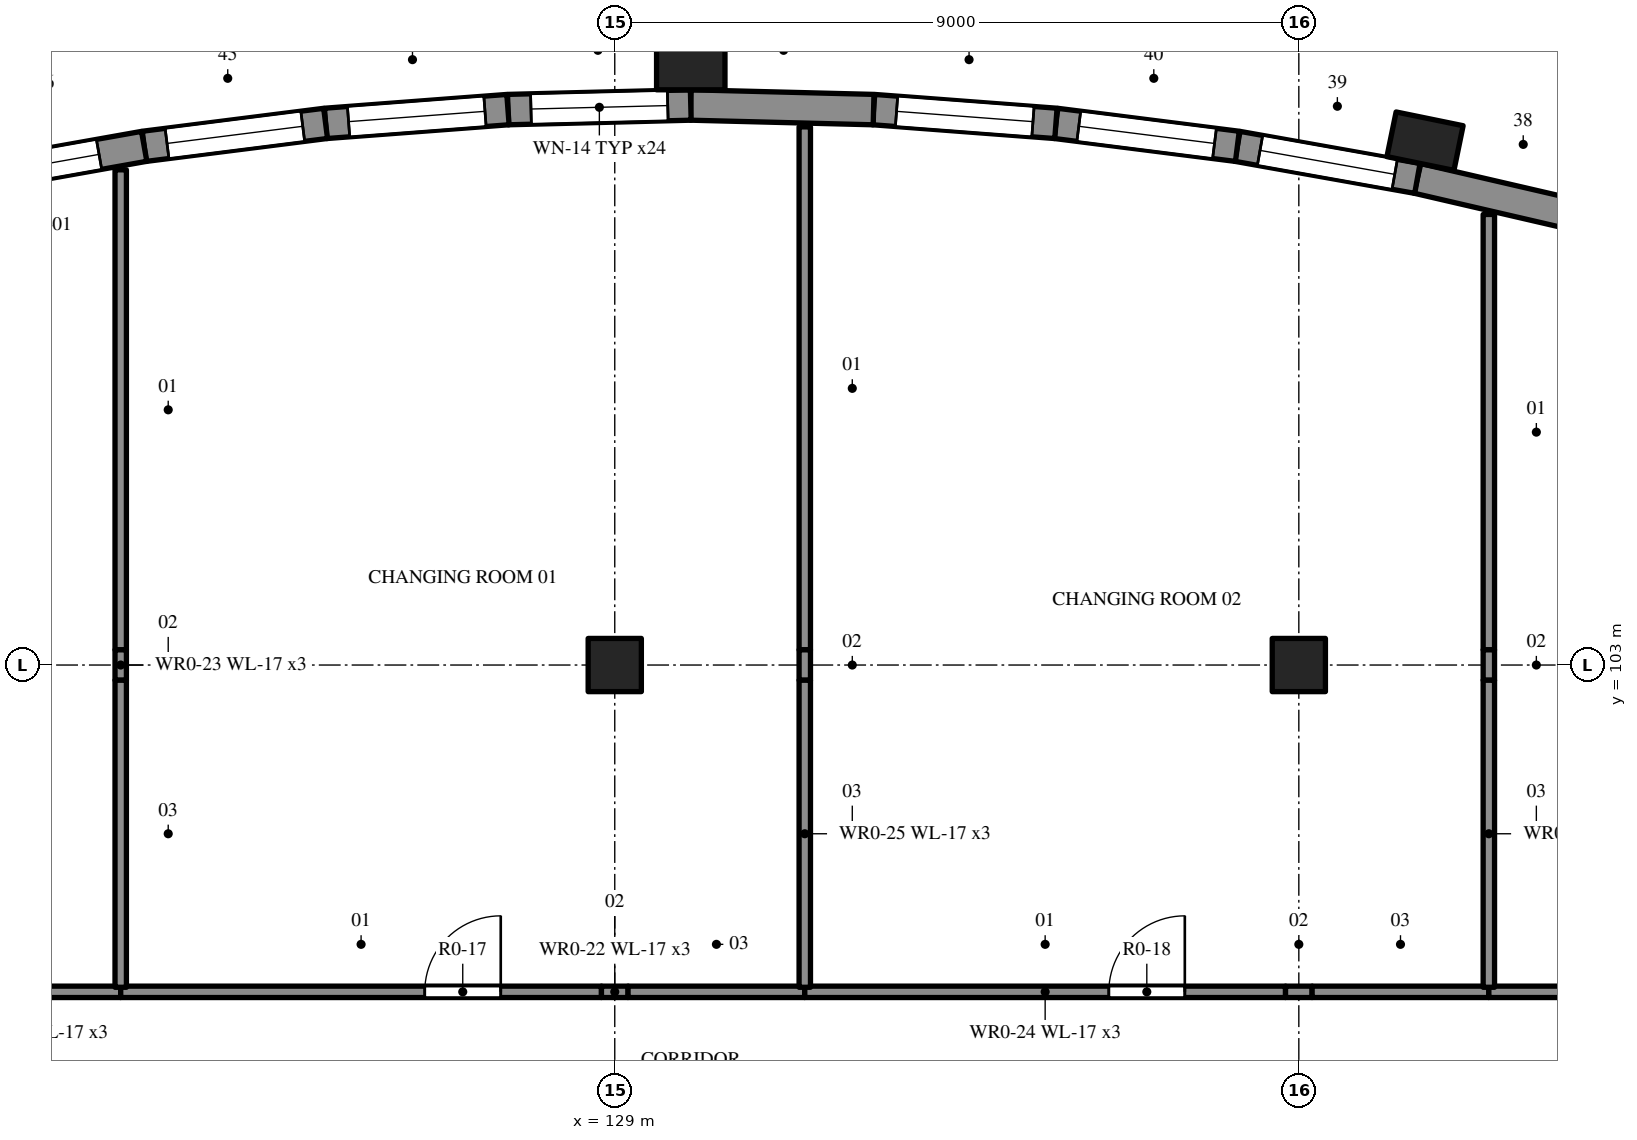
"""IFC4 building model, lengths in metres.
Left out: names, types, materials, properties, quantities, classifications, styles, units other than length and angle.
Written with IfcOpenShell. Run it as: python <this file> out.ifc"""

import sys

from ifc_helpers import new_model, si_unit, direction, frame, frame_2d, origin, origin_2d, place, context, subcontext, project, spatial, rectangle, extrude, element, fill, save


model = new_model("IFC4")
c1 = context("Model", 3, precision=1e-05, world=origin(), true_north=direction((0.0, 1.0)))
c2 = subcontext(c1, "Body", "Model", "MODEL_VIEW")
j1 = project(units=[si_unit("LENGTHUNIT", "METRE"), si_unit("PLANEANGLEUNIT", "RADIAN")], contexts=[c1])
p1 = place(None, origin())
s1 = spatial("IfcSite", under=j1, at=p1, CompositionType="ELEMENT")
p2 = place(p1, origin())
s2 = spatial("IfcBuilding", under=s1, at=p2, CompositionType="ELEMENT")
p3 = place(p2, origin())
s3 = spatial("IfcBuildingStorey", under=s2, at=p3, CompositionType="ELEMENT", Elevation=0.0)
for number, where, z_axis, x_axis in (
    (1, (129.0, 103.0, -0.25), (0.0, 0.0, 1.0), (1.0, 0.0, 0.0)),
    (2, (138.0, 103.0, -0.25), (0.0, 0.0, 1.0), (1.0, 0.0, 0.0)),
):
    element("IfcColumn", number, at=place(p3, frame(where, z_axis=z_axis, x_axis=x_axis)), inside=s3, PredefinedType="COLUMN", context=c2, shape_type="SweptSolid", body=[
        extrude(rectangle(XDim=0.7, YDim=0.7, at=origin_2d()), origin(), (0.0, 0.0, 1.0), 5.37),
    ])
p4 = place(p3, frame((142.006, 108.836, -0.25), z_axis=(0.0, 0.0, 1.0), x_axis=(-0.974189274843, 0.225732710925, 0.0)))
e3 = element("IfcWall", 3, at=p4, inside=s3, PredefinedType="SOLIDWALL", context=c2, shape_type="SweptSolid", body=[
    extrude(rectangle(XDim=2.511, YDim=0.4, at=frame_2d((1.256, 0.0))), origin(), (0.0, 0.0, 1.0), 5.65),
])
p5 = place(p3, frame((139.56, 109.403, -0.25), z_axis=(0.0, 0.0, 1.0), x_axis=(-0.984524011381, 0.175249738987, 0.0)))
e4 = element("IfcWall", 4, at=p5, inside=s3, PredefinedType="SOLIDWALL", context=c2, shape_type="SweptSolid", body=[
    extrude(rectangle(XDim=2.406, YDim=0.4, at=frame_2d((1.203, 0.0))), origin(), (0.0, 0.0, 1.0), 5.65),
])
p6 = place(p5, frame((0.303, 0.0, 1.25)))
e5 = element("IfcOpeningElement", 5, at=p6, cuts=e4, PredefinedType="OPENING", context=c2, shape_type="SweptSolid", body=[
    extrude(rectangle(XDim=1.8, YDim=2.1, at=frame_2d((0.9, 1.05))), frame((0.0, 0.21, 0.0), z_axis=(0.0, -1.0, 0.0), x_axis=(1.0, 0.0, 0.0)), (0.0, 0.0, 1.0), 0.42),
])
p7 = place(p3, frame((137.191, 109.825, -0.25), z_axis=(0.0, 0.0, 1.0), x_axis=(-0.99208939311, 0.125533406227, 0.0)))
e6 = element("IfcWall", 6, at=p7, inside=s3, PredefinedType="SOLIDWALL", context=c2, shape_type="SweptSolid", body=[
    extrude(rectangle(XDim=2.406, YDim=0.4, at=frame_2d((1.203, 0.0))), origin(), (0.0, 0.0, 1.0), 5.65),
])
p8 = place(p7, frame((0.303, 0.0, 1.25)))
e7 = element("IfcOpeningElement", 7, at=p8, cuts=e6, PredefinedType="OPENING", context=c2, shape_type="SweptSolid", body=[
    extrude(rectangle(XDim=1.8, YDim=2.1, at=frame_2d((0.9, 1.05))), frame((0.0, 0.21, 0.0), z_axis=(0.0, -1.0, 0.0), x_axis=(1.0, 0.0, 0.0)), (0.0, 0.0, 1.0), 0.42),
])
p9 = place(p3, frame((134.804, 110.127, -0.25), z_axis=(0.0, 0.0, 1.0), x_axis=(-0.997153910364, 0.075392831525, 0.0)))
e8 = element("IfcWall", 8, at=p9, inside=s3, PredefinedType="SOLIDWALL", context=c2, shape_type="SweptSolid", body=[
    extrude(rectangle(XDim=2.406, YDim=0.4, at=frame_2d((1.203, 0.0))), origin(), (0.0, 0.0, 1.0), 5.65),
])
p10 = place(p9, frame((0.303, 0.0, 1.25)))
e9 = element("IfcOpeningElement", 9, at=p10, cuts=e8, PredefinedType="OPENING", context=c2, shape_type="SweptSolid", body=[
    extrude(rectangle(XDim=1.8, YDim=2.1, at=frame_2d((0.9, 1.05))), frame((0.0, 0.21, 0.0), z_axis=(0.0, -1.0, 0.0), x_axis=(1.0, 0.0, 0.0)), (0.0, 0.0, 1.0), 0.42),
])
p11 = place(p3, frame((132.405, 110.308, -0.25), z_axis=(0.0, 0.0, 1.0), x_axis=(-0.999683321759, 0.025164582196, 0.0)))
e10 = element("IfcWall", 10, at=p11, inside=s3, PredefinedType="SOLIDWALL", context=c2, shape_type="SweptSolid", body=[
    extrude(rectangle(XDim=2.406, YDim=0.4, at=frame_2d((1.203, 0.0))), origin(), (0.0, 0.0, 1.0), 5.65),
])
p12 = place(p3, frame((130.0, 110.369, -0.25), z_axis=(0.0, 0.0, 1.0), x_axis=(-0.999683321759, -0.025164582196, 0.0)))
e11 = element("IfcWall", 11, at=p12, inside=s3, PredefinedType="SOLIDWALL", context=c2, shape_type="SweptSolid", body=[
    extrude(rectangle(XDim=2.406, YDim=0.4, at=frame_2d((1.203, 0.0))), origin(), (0.0, 0.0, 1.0), 5.65),
])
p13 = place(p12, frame((0.303, 0.0, 1.25)))
e12 = element("IfcOpeningElement", 12, at=p13, cuts=e11, PredefinedType="OPENING", context=c2, shape_type="SweptSolid", body=[
    extrude(rectangle(XDim=1.8, YDim=2.1, at=frame_2d((0.9, 1.05))), frame((0.0, 0.21, 0.0), z_axis=(0.0, -1.0, 0.0), x_axis=(1.0, 0.0, 0.0)), (0.0, 0.0, 1.0), 0.42),
])
p14 = place(p3, frame((127.595, 110.308, -0.25), z_axis=(0.0, 0.0, 1.0), x_axis=(-0.997153910364, -0.075392831525, 0.0)))
e13 = element("IfcWall", 13, at=p14, inside=s3, PredefinedType="SOLIDWALL", context=c2, shape_type="SweptSolid", body=[
    extrude(rectangle(XDim=2.406, YDim=0.4, at=frame_2d((1.203, 0.0))), origin(), (0.0, 0.0, 1.0), 5.65),
])
p15 = place(p14, frame((0.303, 0.0, 1.25)))
e14 = element("IfcOpeningElement", 14, at=p15, cuts=e13, PredefinedType="OPENING", context=c2, shape_type="SweptSolid", body=[
    extrude(rectangle(XDim=1.8, YDim=2.1, at=frame_2d((0.9, 1.05))), frame((0.0, 0.21, 0.0), z_axis=(0.0, -1.0, 0.0), x_axis=(1.0, 0.0, 0.0)), (0.0, 0.0, 1.0), 0.42),
])
p16 = place(p3, frame((125.196, 110.127, -0.25), z_axis=(0.0, 0.0, 1.0), x_axis=(-0.99208939311, -0.125533406227, 0.0)))
e15 = element("IfcWall", 15, at=p16, inside=s3, PredefinedType="SOLIDWALL", context=c2, shape_type="SweptSolid", body=[
    extrude(rectangle(XDim=2.406, YDim=0.4, at=frame_2d((1.203, 0.0))), origin(), (0.0, 0.0, 1.0), 5.65),
])
p17 = place(p16, frame((0.303, 0.0, 1.25)))
e16 = element("IfcOpeningElement", 16, at=p17, cuts=e15, PredefinedType="OPENING", context=c2, shape_type="SweptSolid", body=[
    extrude(rectangle(XDim=1.8, YDim=2.1, at=frame_2d((0.9, 1.05))), frame((0.0, 0.21, 0.0), z_axis=(0.0, -1.0, 0.0), x_axis=(1.0, 0.0, 0.0)), (0.0, 0.0, 1.0), 0.42),
])
p18 = place(p3, frame((122.809, 109.825, -0.25), z_axis=(0.0, 0.0, 1.0), x_axis=(-0.984524011381, -0.175249738987, 0.0)))
e17 = element("IfcWall", 17, at=p18, inside=s3, PredefinedType="SOLIDWALL", context=c2, shape_type="SweptSolid", body=[
    extrude(rectangle(XDim=2.406, YDim=0.4, at=frame_2d((1.203, 0.0))), origin(), (0.0, 0.0, 1.0), 5.65),
])
p19 = place(p18, frame((0.603, 0.0, 1.15)))
e18 = element("IfcOpeningElement", 18, at=p19, cuts=e17, PredefinedType="OPENING", context=c2, shape_type="SweptSolid", body=[
    extrude(rectangle(XDim=1.5, YDim=2.1, at=frame_2d((0.75, 1.05))), frame((0.0, 0.21, 0.0), z_axis=(0.0, -1.0, 0.0), x_axis=(1.0, 0.0, 0.0)), (0.0, 0.0, 1.0), 0.42),
])
for number, where, z_axis, x_axis in (
    (19, (130.0, 110.869, -0.25), (0.0, 0.0, 1.0), (-1.0, 0.0, 0.0)),
    (20, (139.66, 109.893, -0.25), (0.0, 0.0, 1.0), (-0.98, 0.201, 0.0)),
):
    element("IfcColumn", number, at=place(p3, frame(where, z_axis=z_axis, x_axis=x_axis)), inside=s3, PredefinedType="PILASTER", context=c2, shape_type="SweptSolid", body=[
        extrude(rectangle(XDim=0.9, YDim=0.6, at=origin_2d()), origin(), (0.0, 0.0, 1.0), 5.65),
    ])
p20 = place(p3, frame((120.175, 98.7, 0.0), z_axis=(0.0, 0.0, 1.0), x_axis=(1.0, 0.0, 0.0)))
e21 = element("IfcWall", 21, at=p20, inside=s3, PredefinedType="PARTITIONING", context=c2, shape_type="SweptSolid", body=[
    extrude(rectangle(XDim=2.325, YDim=0.15, at=frame_2d((1.163, 0.0))), origin(), (0.0, 0.0, 1.0), 5.12),
])
p21 = place(p3, frame((122.5, 98.7, 0.0), z_axis=(0.0, 0.0, 1.0), x_axis=(1.0, 0.0, 0.0)))
e22 = element("IfcWall", 22, at=p21, inside=s3, PredefinedType="PARTITIONING", context=c2, shape_type="SweptSolid", body=[
    extrude(rectangle(XDim=6.325, YDim=0.15, at=frame_2d((3.163, 0.0))), origin(), (0.0, 0.0, 1.0), 5.12),
])
p22 = place(p21, frame((4.0, 0.0, 0.0)))
e23 = element("IfcOpeningElement", 23, at=p22, cuts=e22, PredefinedType="OPENING", context=c2, shape_type="SweptSolid", body=[
    extrude(rectangle(XDim=1.0, YDim=2.1, at=frame_2d((0.5, 1.05))), frame((0.0, 0.085, 0.0), z_axis=(0.0, -1.0, 0.0), x_axis=(1.0, 0.0, 0.0)), (0.0, 0.0, 1.0), 0.17),
])
p23 = place(p3, frame((128.825, 98.7, 0.0), z_axis=(0.0, 0.0, 1.0), x_axis=(1.0, 0.0, 0.0)))
e24 = element("IfcWall", 24, at=p23, inside=s3, PredefinedType="PARTITIONING", context=c2, shape_type="SweptSolid", body=[
    extrude(rectangle(XDim=0.35, YDim=0.15, at=frame_2d((0.175, 0.0))), origin(), (0.0, 0.0, 1.0), 4.42),
])
p24 = place(p3, frame((129.175, 98.7, 0.0), z_axis=(0.0, 0.0, 1.0), x_axis=(1.0, 0.0, 0.0)))
e25 = element("IfcWall", 25, at=p24, inside=s3, PredefinedType="PARTITIONING", context=c2, shape_type="SweptSolid", body=[
    extrude(rectangle(XDim=2.325, YDim=0.15, at=frame_2d((1.163, 0.0))), origin(), (0.0, 0.0, 1.0), 5.12),
])
p25 = place(p3, frame((122.5, 109.516, 0.0), z_axis=(0.0, 0.0, 1.0), x_axis=(0.0, -1.0, 0.0)))
e26 = element("IfcWall", 26, at=p25, inside=s3, PredefinedType="PARTITIONING", context=c2, shape_type="SweptSolid", body=[
    extrude(rectangle(XDim=6.316, YDim=0.15, at=frame_2d((3.158, 0.0))), origin(), (0.0, 0.0, 1.0), 5.12),
])
p26 = place(p3, frame((122.5, 103.2, 0.0), z_axis=(0.0, 0.0, 1.0), x_axis=(0.0, -1.0, 0.0)))
e27 = element("IfcWall", 27, at=p26, inside=s3, PredefinedType="PARTITIONING", context=c2, shape_type="SweptSolid", body=[
    extrude(rectangle(XDim=0.4, YDim=0.15, at=frame_2d((0.2, 0.0))), origin(), (0.0, 0.0, 1.0), 4.32),
])
p27 = place(p3, frame((122.5, 102.8, 0.0), z_axis=(0.0, 0.0, 1.0), x_axis=(0.0, -1.0, 0.0)))
e28 = element("IfcWall", 28, at=p27, inside=s3, PredefinedType="PARTITIONING", context=c2, shape_type="SweptSolid", body=[
    extrude(rectangle(XDim=4.04, YDim=0.15, at=frame_2d((2.02, 0.0))), origin(), (0.0, 0.0, 1.0), 5.12),
])
p28 = place(p3, frame((131.5, 98.7, 0.0), z_axis=(0.0, 0.0, 1.0), x_axis=(1.0, 0.0, 0.0)))
e29 = element("IfcWall", 29, at=p28, inside=s3, PredefinedType="PARTITIONING", context=c2, shape_type="SweptSolid", body=[
    extrude(rectangle(XDim=6.325, YDim=0.15, at=frame_2d((3.163, 0.0))), origin(), (0.0, 0.0, 1.0), 5.12),
])
p29 = place(p28, frame((4.0, 0.0, 0.0)))
e30 = element("IfcOpeningElement", 30, at=p29, cuts=e29, PredefinedType="OPENING", context=c2, shape_type="SweptSolid", body=[
    extrude(rectangle(XDim=1.0, YDim=2.1, at=frame_2d((0.5, 1.05))), frame((0.0, 0.085, 0.0), z_axis=(0.0, -1.0, 0.0), x_axis=(1.0, 0.0, 0.0)), (0.0, 0.0, 1.0), 0.17),
])
p30 = place(p3, frame((137.825, 98.7, 0.0), z_axis=(0.0, 0.0, 1.0), x_axis=(1.0, 0.0, 0.0)))
e31 = element("IfcWall", 31, at=p30, inside=s3, PredefinedType="PARTITIONING", context=c2, shape_type="SweptSolid", body=[
    extrude(rectangle(XDim=0.35, YDim=0.15, at=frame_2d((0.175, 0.0))), origin(), (0.0, 0.0, 1.0), 4.42),
])
p31 = place(p3, frame((138.175, 98.7, 0.0), z_axis=(0.0, 0.0, 1.0), x_axis=(1.0, 0.0, 0.0)))
e32 = element("IfcWall", 32, at=p31, inside=s3, PredefinedType="PARTITIONING", context=c2, shape_type="SweptSolid", body=[
    extrude(rectangle(XDim=2.325, YDim=0.15, at=frame_2d((1.163, 0.0))), origin(), (0.0, 0.0, 1.0), 5.12),
])
p32 = place(p3, frame((131.5, 110.081, 0.0), z_axis=(0.0, 0.0, 1.0), x_axis=(0.0, -1.0, 0.0)))
e33 = element("IfcWall", 33, at=p32, inside=s3, PredefinedType="PARTITIONING", context=c2, shape_type="SweptSolid", body=[
    extrude(rectangle(XDim=6.881, YDim=0.15, at=frame_2d((3.44, 0.0))), origin(), (0.0, 0.0, 1.0), 5.12),
])
p33 = place(p3, frame((131.5, 103.2, 0.0), z_axis=(0.0, 0.0, 1.0), x_axis=(0.0, -1.0, 0.0)))
e34 = element("IfcWall", 34, at=p33, inside=s3, PredefinedType="PARTITIONING", context=c2, shape_type="SweptSolid", body=[
    extrude(rectangle(XDim=0.4, YDim=0.15, at=frame_2d((0.2, 0.0))), origin(), (0.0, 0.0, 1.0), 4.32),
])
p34 = place(p3, frame((131.5, 102.8, 0.0), z_axis=(0.0, 0.0, 1.0), x_axis=(0.0, -1.0, 0.0)))
e35 = element("IfcWall", 35, at=p34, inside=s3, PredefinedType="PARTITIONING", context=c2, shape_type="SweptSolid", body=[
    extrude(rectangle(XDim=4.04, YDim=0.15, at=frame_2d((2.02, 0.0))), origin(), (0.0, 0.0, 1.0), 5.12),
])
p35 = place(p3, frame((140.5, 98.7, 0.0), z_axis=(0.0, 0.0, 1.0), x_axis=(1.0, 0.0, 0.0)))
e36 = element("IfcWall", 36, at=p35, inside=s3, PredefinedType="PARTITIONING", context=c2, shape_type="SweptSolid", body=[
    extrude(rectangle(XDim=6.325, YDim=0.15, at=frame_2d((3.163, 0.0))), origin(), (0.0, 0.0, 1.0), 5.12),
])
p36 = place(p35, frame((4.3, 0.0, 0.0)))
e37 = element("IfcOpeningElement", 37, at=p36, cuts=e36, PredefinedType="OPENING", context=c2, shape_type="SweptSolid", body=[
    extrude(rectangle(XDim=1.0, YDim=2.1, at=frame_2d((0.5, 1.05))), frame((0.0, 0.085, 0.0), z_axis=(0.0, -1.0, 0.0), x_axis=(1.0, 0.0, 0.0)), (0.0, 0.0, 1.0), 0.17),
])
p37 = place(p3, frame((140.5, 108.928, 0.0), z_axis=(0.0, 0.0, 1.0), x_axis=(0.0, -1.0, 0.0)))
e38 = element("IfcWall", 38, at=p37, inside=s3, PredefinedType="PARTITIONING", context=c2, shape_type="SweptSolid", body=[
    extrude(rectangle(XDim=5.729, YDim=0.15, at=frame_2d((2.864, 0.0))), origin(), (0.0, 0.0, 1.0), 5.12),
])
p38 = place(p3, frame((140.5, 103.2, 0.0), z_axis=(0.0, 0.0, 1.0), x_axis=(0.0, -1.0, 0.0)))
e39 = element("IfcWall", 39, at=p38, inside=s3, PredefinedType="PARTITIONING", context=c2, shape_type="SweptSolid", body=[
    extrude(rectangle(XDim=0.4, YDim=0.15, at=frame_2d((0.2, 0.0))), origin(), (0.0, 0.0, 1.0), 4.32),
])
p39 = place(p3, frame((140.5, 102.8, 0.0), z_axis=(0.0, 0.0, 1.0), x_axis=(0.0, -1.0, 0.0)))
e40 = element("IfcWall", 40, at=p39, inside=s3, PredefinedType="PARTITIONING", context=c2, shape_type="SweptSolid", body=[
    extrude(rectangle(XDim=4.04, YDim=0.15, at=frame_2d((2.02, 0.0))), origin(), (0.0, 0.0, 1.0), 5.12),
])
p40 = place(p6, origin())
e41 = element("IfcWindow", 41, at=p40, inside=s3, PartitioningType="SINGLE_PANEL", PredefinedType="WINDOW", context=c2, shape_type="SweptSolid", body=[
    extrude(rectangle(XDim=1.8, YDim=2.1, at=frame_2d((0.9, 1.05))), frame((0.0, 0.03, 0.0), z_axis=(0.0, -1.0, 0.0), x_axis=(1.0, 0.0, 0.0)), (0.0, 0.0, 1.0), 0.06),
])
fill(e5, e41)
p41 = place(p8, origin())
e42 = element("IfcWindow", 42, at=p41, inside=s3, PartitioningType="SINGLE_PANEL", PredefinedType="WINDOW", context=c2, shape_type="SweptSolid", body=[
    extrude(rectangle(XDim=1.8, YDim=2.1, at=frame_2d((0.9, 1.05))), frame((0.0, 0.03, 0.0), z_axis=(0.0, -1.0, 0.0), x_axis=(1.0, 0.0, 0.0)), (0.0, 0.0, 1.0), 0.06),
])
fill(e7, e42)
p42 = place(p10, origin())
e43 = element("IfcWindow", 43, at=p42, inside=s3, PartitioningType="SINGLE_PANEL", PredefinedType="WINDOW", context=c2, shape_type="SweptSolid", body=[
    extrude(rectangle(XDim=1.8, YDim=2.1, at=frame_2d((0.9, 1.05))), frame((0.0, 0.03, 0.0), z_axis=(0.0, -1.0, 0.0), x_axis=(1.0, 0.0, 0.0)), (0.0, 0.0, 1.0), 0.06),
])
fill(e9, e43)
p43 = place(p13, origin())
e44 = element("IfcWindow", 44, at=p43, inside=s3, PartitioningType="SINGLE_PANEL", PredefinedType="WINDOW", context=c2, shape_type="SweptSolid", body=[
    extrude(rectangle(XDim=1.8, YDim=2.1, at=frame_2d((0.9, 1.05))), frame((0.0, 0.03, 0.0), z_axis=(0.0, -1.0, 0.0), x_axis=(1.0, 0.0, 0.0)), (0.0, 0.0, 1.0), 0.06),
])
fill(e12, e44)
p44 = place(p15, origin())
e45 = element("IfcWindow", 45, at=p44, inside=s3, PartitioningType="SINGLE_PANEL", PredefinedType="WINDOW", context=c2, shape_type="SweptSolid", body=[
    extrude(rectangle(XDim=1.8, YDim=2.1, at=frame_2d((0.9, 1.05))), frame((0.0, 0.03, 0.0), z_axis=(0.0, -1.0, 0.0), x_axis=(1.0, 0.0, 0.0)), (0.0, 0.0, 1.0), 0.06),
])
fill(e14, e45)
p45 = place(p17, origin())
e46 = element("IfcWindow", 46, at=p45, inside=s3, PartitioningType="SINGLE_PANEL", PredefinedType="WINDOW", context=c2, shape_type="SweptSolid", body=[
    extrude(rectangle(XDim=1.8, YDim=2.1, at=frame_2d((0.9, 1.05))), frame((0.0, 0.03, 0.0), z_axis=(0.0, -1.0, 0.0), x_axis=(1.0, 0.0, 0.0)), (0.0, 0.0, 1.0), 0.06),
])
fill(e16, e46)
p46 = place(p19, origin())
e47 = element("IfcWindow", 47, at=p46, inside=s3, PartitioningType="SINGLE_PANEL", PredefinedType="WINDOW", context=c2, shape_type="SweptSolid", body=[
    extrude(rectangle(XDim=1.5, YDim=2.1, at=frame_2d((0.75, 1.05))), frame((0.0, 0.03, 0.0), z_axis=(0.0, -1.0, 0.0), x_axis=(1.0, 0.0, 0.0)), (0.0, 0.0, 1.0), 0.06),
])
fill(e18, e47)
p47 = place(p22, origin())
e48 = element("IfcDoor", 48, at=p47, inside=s3, OperationType="SINGLE_SWING_RIGHT", PredefinedType="DOOR", context=c2, shape_type="SweptSolid", body=[
    extrude(rectangle(XDim=1.0, YDim=2.1, at=frame_2d((0.5, 1.05))), frame((0.0, 0.025, 0.0), z_axis=(0.0, -1.0, 0.0), x_axis=(1.0, 0.0, 0.0)), (0.0, 0.0, 1.0), 0.05),
])
fill(e23, e48)
p48 = place(p29, origin())
e49 = element("IfcDoor", 49, at=p48, inside=s3, OperationType="SINGLE_SWING_RIGHT", PredefinedType="DOOR", context=c2, shape_type="SweptSolid", body=[
    extrude(rectangle(XDim=1.0, YDim=2.1, at=frame_2d((0.5, 1.05))), frame((0.0, 0.025, 0.0), z_axis=(0.0, -1.0, 0.0), x_axis=(1.0, 0.0, 0.0)), (0.0, 0.0, 1.0), 0.05),
])
fill(e30, e49)
save(model, sys.argv[1])
